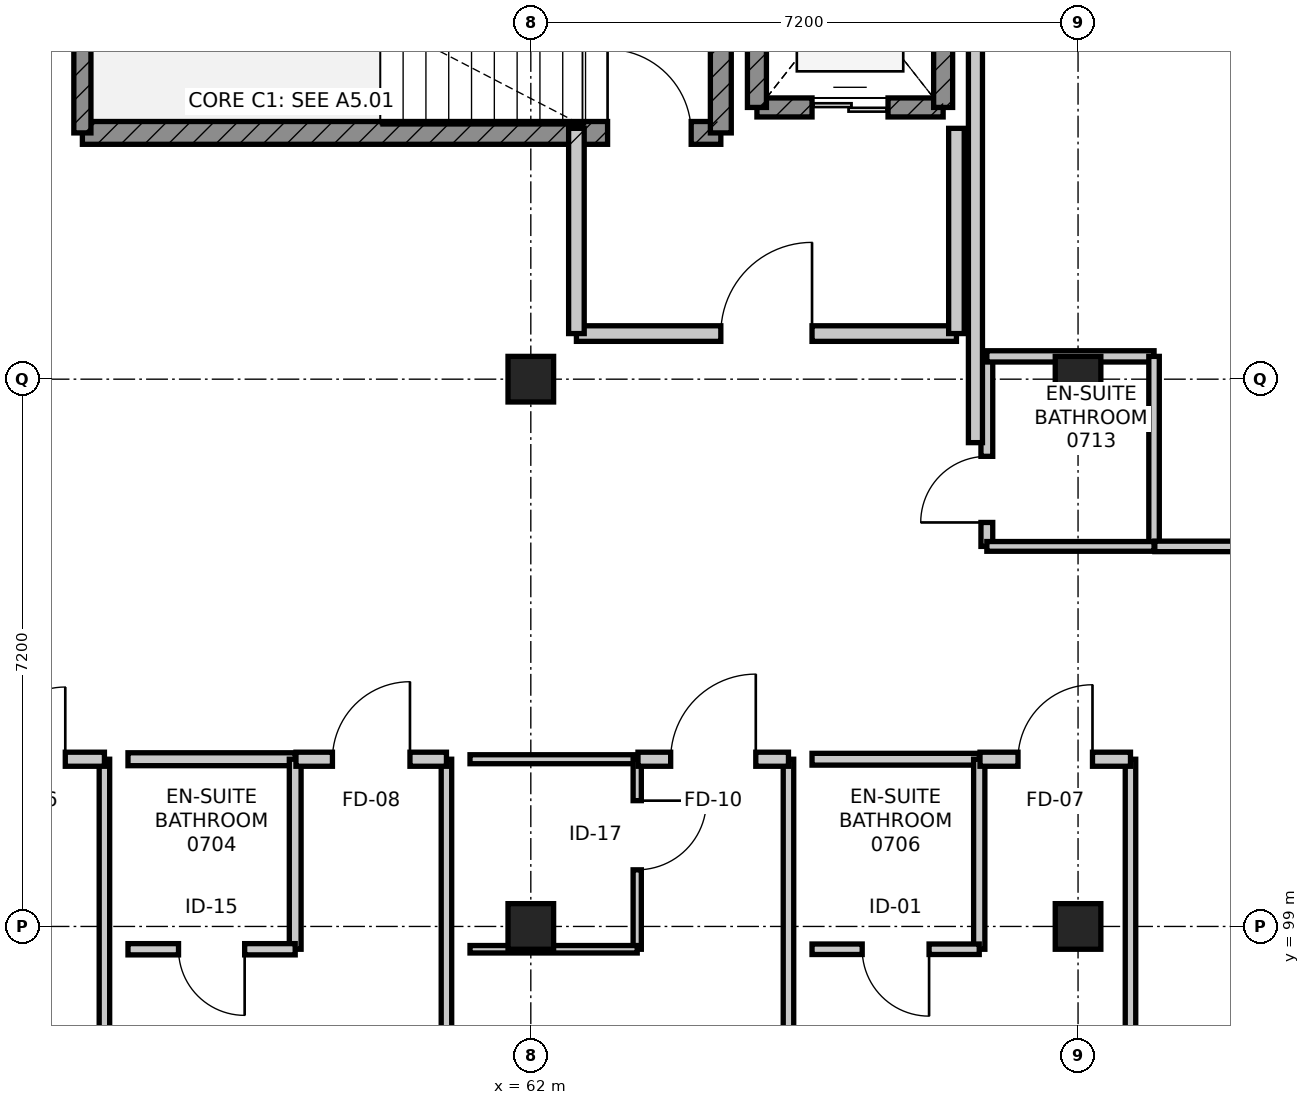
"""IFC4 building model, lengths in metres.
Left out: names, types, materials, properties, quantities, classifications, styles, units other than length and angle.
Written with IfcOpenShell. Run it as: python <this file> out.ifc"""

import sys

from ifc_helpers import new_model, si_unit, direction, frame, frame_2d, origin, origin_2d, place, context, subcontext, project, spatial, rectangle, extrude, element, fill, save


model = new_model("IFC4")
c1 = context("Model", 3, precision=1e-05, world=origin(), true_north=direction((0.0, 1.0)))
c2 = subcontext(c1, "Body", "Model", "MODEL_VIEW")
j1 = project(units=[si_unit("LENGTHUNIT", "METRE"), si_unit("PLANEANGLEUNIT", "RADIAN")], contexts=[c1])
p1 = place(None, origin())
s1 = spatial("IfcSite", under=j1, at=p1, CompositionType="ELEMENT")
p2 = place(p1, origin())
s2 = spatial("IfcBuilding", under=s1, at=p2, CompositionType="ELEMENT")
p3 = place(p2, frame((0.0, 0.0, 30.0)))
s3 = spatial("IfcBuildingStorey", under=s2, at=p3, CompositionType="ELEMENT", Elevation=30.0)
for number, where, z_axis, x_axis in (
    (1, (62.0, 99.0, 0.0), (0.0, 0.0, 1.0), (1.0, 0.0, 0.0)),
    (2, (62.0, 106.2, 0.0), (0.0, 0.0, 1.0), (1.0, 0.0, 0.0)),
    (3, (69.2, 99.0, 0.0), (0.0, 0.0, 1.0), (1.0, 0.0, 0.0)),
    (4, (69.2, 106.2, 0.0), (0.0, 0.0, 1.0), (1.0, 0.0, 0.0)),
):
    element("IfcColumn", number, at=place(p3, frame(where, z_axis=z_axis, x_axis=x_axis)), inside=s3, PredefinedType="COLUMN", context=c2, shape_type="SweptSolid", body=[
        extrude(rectangle(XDim=0.6, YDim=0.6, at=origin_2d()), origin(), (0.0, 0.0, 1.0), 3.6),
    ])
p4 = place(p3, frame((56.1, 109.44, 0.0), z_axis=(0.0, 0.0, 1.0), x_axis=(1.0, 0.0, 0.0)))
e5 = element("IfcWall", 5, at=p4, inside=s3, PredefinedType="SHEAR", context=c2, shape_type="SweptSolid", body=[
    extrude(rectangle(XDim=8.4, YDim=0.3, at=frame_2d((4.2, 0.0))), origin(), (0.0, 0.0, 1.0), 3.36),
])
p5 = place(p4, frame((6.91, 0.0, 0.0)))
e6 = element("IfcOpeningElement", 6, at=p5, cuts=e5, PredefinedType="OPENING", context=c2, shape_type="SweptSolid", body=[
    extrude(rectangle(XDim=1.1, YDim=2.1, at=frame_2d((0.55, 1.05))), frame((0.0, 0.16, 0.0), z_axis=(0.0, -1.0, 0.0), x_axis=(1.0, 0.0, 0.0)), (0.0, 0.0, 1.0), 0.32),
])
p6 = place(p3, frame((64.5, 109.44, 0.0), z_axis=(0.0, 0.0, 1.0), x_axis=(0.0, 1.0, 0.0)))
e7 = element("IfcWall", 7, at=p6, inside=s3, PredefinedType="SHEAR", context=c2, shape_type="SweptSolid", body=[
    extrude(rectangle(XDim=3.56, YDim=0.275, at=frame_2d((1.78, 0.0))), origin(), (0.0, 0.0, 1.0), 3.36),
])
p7 = place(p3, frame((56.1, 113.0, 0.0), z_axis=(0.0, 0.0, 1.0), x_axis=(0.0, -1.0, 0.0)))
e8 = element("IfcWall", 8, at=p7, inside=s3, PredefinedType="SHEAR", context=c2, shape_type="SweptSolid", body=[
    extrude(rectangle(XDim=3.56, YDim=0.225, at=frame_2d((1.78, 0.0))), origin(), (0.0, 0.0, 1.0), 3.36),
])
p8 = place(p3, frame((64.975, 109.775, 0.0), z_axis=(0.0, 0.0, 1.0), x_axis=(1.0, 0.0, 0.0)))
e9 = element("IfcWall", 9, at=p8, inside=s3, PredefinedType="SHEAR", context=c2, shape_type="SweptSolid", body=[
    extrude(rectangle(XDim=2.45, YDim=0.25, at=frame_2d((1.225, 0.0))), origin(), (0.0, 0.0, 1.0), 3.36),
])
p9 = place(p8, frame((0.725, 0.0, 0.0)))
e10 = element("IfcOpeningElement", 10, at=p9, cuts=e9, PredefinedType="OPENING", context=c2, shape_type="SweptSolid", body=[
    extrude(rectangle(XDim=1.0, YDim=2.15, at=frame_2d((0.5, 1.075))), frame((0.0, 0.135, 0.0), z_axis=(0.0, -1.0, 0.0), x_axis=(1.0, 0.0, 0.0)), (0.0, 0.0, 1.0), 0.27),
])
for number, where, z_axis, x_axis in (
    (11, (67.425, 109.775, 0.0), (0.0, 0.0, 1.0), (0.0, 1.0, 0.0)),
    (12, (64.975, 112.825, 0.0), (0.0, 0.0, 1.0), (0.0, -1.0, 0.0)),
):
    element("IfcWall", number, at=place(p3, frame(where, z_axis=z_axis, x_axis=x_axis)), inside=s3, PredefinedType="SHEAR", context=c2, shape_type="SweptSolid", body=[
        extrude(rectangle(XDim=3.05, YDim=0.25, at=frame_2d((1.525, 0.0))), origin(), (0.0, 0.0, 1.0), 3.36),
    ])
p10 = place(p3, frame((62.6, 106.8, 0.0), z_axis=(0.0, 0.0, 1.0), x_axis=(1.0, 0.0, 0.0)))
e13 = element("IfcWall", 13, at=p10, inside=s3, PredefinedType="PARTITIONING", context=c2, shape_type="SweptSolid", body=[
    extrude(rectangle(XDim=5.0, YDim=0.205, at=frame_2d((2.5, 0.0))), origin(), (0.0, 0.0, 1.0), 3.36),
])
p11 = place(p10, frame((1.9, 0.0, 0.0)))
e14 = element("IfcOpeningElement", 14, at=p11, cuts=e13, PredefinedType="OPENING", context=c2, shape_type="SweptSolid", body=[
    extrude(rectangle(XDim=1.2, YDim=2.1, at=frame_2d((0.6, 1.05))), frame((0.0, 0.113, 0.0), z_axis=(0.0, -1.0, 0.0), x_axis=(1.0, 0.0, 0.0)), (0.0, 0.0, 1.0), 0.225),
])
for number, where, z_axis, x_axis in (
    (15, (67.6, 106.8, 0.0), (0.0, 0.0, 1.0), (0.0, 1.0, 0.0)),
    (16, (62.6, 109.5, 0.0), (0.0, 0.0, 1.0), (0.0, -1.0, 0.0)),
):
    element("IfcWall", number, at=place(p3, frame(where, z_axis=z_axis, x_axis=x_axis)), inside=s3, PredefinedType="PARTITIONING", context=c2, shape_type="SweptSolid", body=[
        extrude(rectangle(XDim=2.7, YDim=0.205, at=frame_2d((1.35, 0.0))), origin(), (0.0, 0.0, 1.0), 3.36),
    ])
p12 = place(p3, frame((56.39, 101.2, 0.0), z_axis=(0.0, 0.0, 1.0), x_axis=(0.0, -1.0, 0.0)))
e17 = element("IfcWall", 17, at=p12, inside=s3, PredefinedType="PARTITIONING", context=c2, shape_type="SweptSolid", body=[
    extrude(rectangle(XDim=9.24, YDim=0.138, at=frame_2d((4.62, 0.0))), origin(), (0.0, 0.0, 1.0), 2.745),
])
p13 = place(p3, frame((54.41, 101.2, 0.0), z_axis=(0.0, 0.0, 1.0), x_axis=(1.0, 0.0, 0.0)))
e18 = element("IfcWall", 18, at=p13, inside=s3, PredefinedType="PARTITIONING", context=c2, shape_type="SweptSolid", body=[
    extrude(rectangle(XDim=1.98, YDim=0.185, at=frame_2d((0.99, 0.0))), origin(), (0.0, 0.0, 1.0), 2.695),
])
p14 = place(p13, frame((0.515, 0.0, 0.0)))
e19 = element("IfcOpeningElement", 19, at=p14, cuts=e18, PredefinedType="OPENING", context=c2, shape_type="SweptSolid", body=[
    extrude(rectangle(XDim=0.95, YDim=2.1, at=frame_2d((0.475, 1.05))), frame((0.0, 0.103, 0.0), z_axis=(0.0, -1.0, 0.0), x_axis=(1.0, 0.0, 0.0)), (0.0, 0.0, 1.0), 0.205),
])
p15 = place(p3, frame((56.7, 101.2, 0.0), z_axis=(0.0, 0.0, 1.0), x_axis=(1.0, 0.0, 0.0)))
e20 = element("IfcWall", 20, at=p15, inside=s3, PredefinedType="PARTITIONING", context=c2, shape_type="SweptSolid", body=[
    extrude(rectangle(XDim=2.2, YDim=0.17, at=frame_2d((1.1, 0.0))), origin(), (0.0, 0.0, 1.0), 3.36),
])
p16 = place(p3, frame((58.9, 101.2, 0.0), z_axis=(0.0, 0.0, 1.0), x_axis=(0.0, -1.0, 0.0)))
e21 = element("IfcWall", 21, at=p16, inside=s3, PredefinedType="PARTITIONING", context=c2, shape_type="SweptSolid", body=[
    extrude(rectangle(XDim=2.5, YDim=0.155, at=frame_2d((1.25, 0.0))), origin(), (0.0, 0.0, 1.0), 2.745),
])
p17 = place(p3, frame((58.9, 98.7, 0.0), z_axis=(0.0, 0.0, 1.0), x_axis=(-1.0, 0.0, 0.0)))
e22 = element("IfcWall", 22, at=p17, inside=s3, PredefinedType="PARTITIONING", context=c2, shape_type="SweptSolid", body=[
    extrude(rectangle(XDim=2.2, YDim=0.148, at=frame_2d((1.1, 0.0))), origin(), (0.0, 0.0, 1.0), 3.36),
])
p18 = place(p17, frame((0.665, 0.0, 0.0)))
e23 = element("IfcOpeningElement", 23, at=p18, cuts=e22, PredefinedType="OPENING", context=c2, shape_type="SweptSolid", body=[
    extrude(rectangle(XDim=0.87, YDim=2.07, at=frame_2d((0.435, 1.035))), frame((0.0, 0.084, 0.0), z_axis=(0.0, -1.0, 0.0), x_axis=(1.0, 0.0, 0.0)), (0.0, 0.0, 1.0), 0.168),
])
p19 = place(p3, frame((60.89, 101.2, 0.0), z_axis=(0.0, 0.0, 1.0), x_axis=(0.0, -1.0, 0.0)))
e24 = element("IfcWall", 24, at=p19, inside=s3, PredefinedType="PARTITIONING", context=c2, shape_type="SweptSolid", body=[
    extrude(rectangle(XDim=9.24, YDim=0.138, at=frame_2d((4.62, 0.0))), origin(), (0.0, 0.0, 1.0), 2.745),
])
p20 = place(p3, frame((58.91, 101.2, 0.0), z_axis=(0.0, 0.0, 1.0), x_axis=(1.0, 0.0, 0.0)))
e25 = element("IfcWall", 25, at=p20, inside=s3, PredefinedType="PARTITIONING", context=c2, shape_type="SweptSolid", body=[
    extrude(rectangle(XDim=1.98, YDim=0.185, at=frame_2d((0.99, 0.0))), origin(), (0.0, 0.0, 1.0), 3.36),
])
p21 = place(p20, frame((0.48, 0.0, 0.0)))
e26 = element("IfcOpeningElement", 26, at=p21, cuts=e25, PredefinedType="OPENING", context=c2, shape_type="SweptSolid", body=[
    extrude(rectangle(XDim=1.02, YDim=2.15, at=frame_2d((0.51, 1.075))), frame((0.0, 0.103, 0.0), z_axis=(0.0, -1.0, 0.0), x_axis=(1.0, 0.0, 0.0)), (0.0, 0.0, 1.0), 0.205),
])
p22 = place(p3, frame((61.2, 101.2, 0.0), z_axis=(0.0, 0.0, 1.0), x_axis=(1.0, 0.0, 0.0)))
e27 = element("IfcWall", 27, at=p22, inside=s3, PredefinedType="PARTITIONING", context=c2, shape_type="SweptSolid", body=[
    extrude(rectangle(XDim=2.2, YDim=0.118, at=frame_2d((1.1, 0.0))), origin(), (0.0, 0.0, 1.0), 2.695),
])
p23 = place(p3, frame((63.4, 101.2, 0.0), z_axis=(0.0, 0.0, 1.0), x_axis=(0.0, -1.0, 0.0)))
e28 = element("IfcWall", 28, at=p23, inside=s3, PredefinedType="PARTITIONING", context=c2, shape_type="SweptSolid", body=[
    extrude(rectangle(XDim=2.5, YDim=0.108, at=frame_2d((1.25, 0.0))), origin(), (0.0, 0.0, 1.0), 2.745),
])
p24 = place(p23, frame((0.545, 0.0, 0.0)))
e29 = element("IfcOpeningElement", 29, at=p24, cuts=e28, PredefinedType="OPENING", context=c2, shape_type="SweptSolid", body=[
    extrude(rectangle(XDim=0.91, YDim=2.11, at=frame_2d((0.455, 1.055))), frame((0.0, 0.064, 0.0), z_axis=(0.0, -1.0, 0.0), x_axis=(1.0, 0.0, 0.0)), (0.0, 0.0, 1.0), 0.128),
])
p25 = place(p3, frame((63.4, 98.7, 0.0), z_axis=(0.0, 0.0, 1.0), x_axis=(-1.0, 0.0, 0.0)))
e30 = element("IfcWall", 30, at=p25, inside=s3, PredefinedType="PARTITIONING", context=c2, shape_type="SweptSolid", body=[
    extrude(rectangle(XDim=2.2, YDim=0.098, at=frame_2d((1.1, 0.0))), origin(), (0.0, 0.0, 1.0), 2.695),
])
p26 = place(p3, frame((65.39, 101.2, 0.0), z_axis=(0.0, 0.0, 1.0), x_axis=(0.0, -1.0, 0.0)))
e31 = element("IfcWall", 31, at=p26, inside=s3, PredefinedType="PARTITIONING", context=c2, shape_type="SweptSolid", body=[
    extrude(rectangle(XDim=9.24, YDim=0.138, at=frame_2d((4.62, 0.0))), origin(), (0.0, 0.0, 1.0), 2.745),
])
p27 = place(p3, frame((63.41, 101.2, 0.0), z_axis=(0.0, 0.0, 1.0), x_axis=(1.0, 0.0, 0.0)))
e32 = element("IfcWall", 32, at=p27, inside=s3, PredefinedType="PARTITIONING", context=c2, shape_type="SweptSolid", body=[
    extrude(rectangle(XDim=1.98, YDim=0.185, at=frame_2d((0.99, 0.0))), origin(), (0.0, 0.0, 1.0), 3.36),
])
p28 = place(p27, frame((0.43, 0.0, 0.0)))
e33 = element("IfcOpeningElement", 33, at=p28, cuts=e32, PredefinedType="OPENING", context=c2, shape_type="SweptSolid", body=[
    extrude(rectangle(XDim=1.12, YDim=2.2, at=frame_2d((0.56, 1.1))), frame((0.0, 0.103, 0.0), z_axis=(0.0, -1.0, 0.0), x_axis=(1.0, 0.0, 0.0)), (0.0, 0.0, 1.0), 0.205),
])
p29 = place(p3, frame((65.7, 101.2, 0.0), z_axis=(0.0, 0.0, 1.0), x_axis=(1.0, 0.0, 0.0)))
e34 = element("IfcWall", 34, at=p29, inside=s3, PredefinedType="PARTITIONING", context=c2, shape_type="SweptSolid", body=[
    extrude(rectangle(XDim=2.2, YDim=0.155, at=frame_2d((1.1, 0.0))), origin(), (0.0, 0.0, 1.0), 3.36),
])
p30 = place(p3, frame((67.9, 101.2, 0.0), z_axis=(0.0, 0.0, 1.0), x_axis=(0.0, -1.0, 0.0)))
e35 = element("IfcWall", 35, at=p30, inside=s3, PredefinedType="PARTITIONING", context=c2, shape_type="SweptSolid", body=[
    extrude(rectangle(XDim=2.5, YDim=0.148, at=frame_2d((1.25, 0.0))), origin(), (0.0, 0.0, 1.0), 2.745),
])
p31 = place(p3, frame((67.9, 98.7, 0.0), z_axis=(0.0, 0.0, 1.0), x_axis=(-1.0, 0.0, 0.0)))
e36 = element("IfcWall", 36, at=p31, inside=s3, PredefinedType="PARTITIONING", context=c2, shape_type="SweptSolid", body=[
    extrude(rectangle(XDim=2.2, YDim=0.138, at=frame_2d((1.1, 0.0))), origin(), (0.0, 0.0, 1.0), 3.36),
])
p32 = place(p31, frame((0.66, 0.0, 0.0)))
e37 = element("IfcOpeningElement", 37, at=p32, cuts=e36, PredefinedType="OPENING", context=c2, shape_type="SweptSolid", body=[
    extrude(rectangle(XDim=0.88, YDim=2.06, at=frame_2d((0.44, 1.03))), frame((0.0, 0.079, 0.0), z_axis=(0.0, -1.0, 0.0), x_axis=(1.0, 0.0, 0.0)), (0.0, 0.0, 1.0), 0.158),
])
p33 = place(p3, frame((69.89, 101.2, 0.0), z_axis=(0.0, 0.0, 1.0), x_axis=(0.0, -1.0, 0.0)))
e38 = element("IfcWall", 38, at=p33, inside=s3, PredefinedType="PARTITIONING", context=c2, shape_type="SweptSolid", body=[
    extrude(rectangle(XDim=9.24, YDim=0.138, at=frame_2d((4.62, 0.0))), origin(), (0.0, 0.0, 1.0), 2.745),
])
p34 = place(p3, frame((67.91, 101.2, 0.0), z_axis=(0.0, 0.0, 1.0), x_axis=(1.0, 0.0, 0.0)))
e39 = element("IfcWall", 39, at=p34, inside=s3, PredefinedType="PARTITIONING", context=c2, shape_type="SweptSolid", body=[
    extrude(rectangle(XDim=1.98, YDim=0.185, at=frame_2d((0.99, 0.0))), origin(), (0.0, 0.0, 1.0), 2.695),
])
p35 = place(p34, frame((0.5, 0.0, 0.0)))
e40 = element("IfcOpeningElement", 40, at=p35, cuts=e39, PredefinedType="OPENING", context=c2, shape_type="SweptSolid", body=[
    extrude(rectangle(XDim=0.98, YDim=2.15, at=frame_2d((0.49, 1.075))), frame((0.0, 0.103, 0.0), z_axis=(0.0, -1.0, 0.0), x_axis=(1.0, 0.0, 0.0)), (0.0, 0.0, 1.0), 0.205),
])
p36 = place(p3, frame((68.0, 104.0, 0.0), z_axis=(0.0, 0.0, 1.0), x_axis=(0.0, 1.0, 0.0)))
e41 = element("IfcWall", 41, at=p36, inside=s3, PredefinedType="PARTITIONING", context=c2, shape_type="SweptSolid", body=[
    extrude(rectangle(XDim=2.5, YDim=0.155, at=frame_2d((1.25, 0.0))), origin(), (0.0, 0.0, 1.0), 2.745),
])
p37 = place(p36, frame((0.315, 0.0, 0.0)))
e42 = element("IfcOpeningElement", 42, at=p37, cuts=e41, PredefinedType="OPENING", context=c2, shape_type="SweptSolid", body=[
    extrude(rectangle(XDim=0.87, YDim=2.07, at=frame_2d((0.435, 1.035))), frame((0.0, 0.087, 0.0), z_axis=(0.0, -1.0, 0.0), x_axis=(1.0, 0.0, 0.0)), (0.0, 0.0, 1.0), 0.175),
])
p38 = place(p3, frame((68.0, 106.5, 0.0), z_axis=(0.0, 0.0, 1.0), x_axis=(1.0, 0.0, 0.0)))
e43 = element("IfcWall", 43, at=p38, inside=s3, PredefinedType="PARTITIONING", context=c2, shape_type="SweptSolid", body=[
    extrude(rectangle(XDim=2.2, YDim=0.148, at=frame_2d((1.1, 0.0))), origin(), (0.0, 0.0, 1.0), 2.695),
])
p39 = place(p3, frame((70.2, 106.5, 0.0), z_axis=(0.0, 0.0, 1.0), x_axis=(0.0, -1.0, 0.0)))
e44 = element("IfcWall", 44, at=p39, inside=s3, PredefinedType="PARTITIONING", context=c2, shape_type="SweptSolid", body=[
    extrude(rectangle(XDim=2.5, YDim=0.138, at=frame_2d((1.25, 0.0))), origin(), (0.0, 0.0, 1.0), 2.745),
])
p40 = place(p3, frame((70.2, 104.0, 0.0), z_axis=(0.0, 0.0, 1.0), x_axis=(-1.0, 0.0, 0.0)))
e45 = element("IfcWall", 45, at=p40, inside=s3, PredefinedType="PARTITIONING", context=c2, shape_type="SweptSolid", body=[
    extrude(rectangle(XDim=2.2, YDim=0.128, at=frame_2d((1.1, 0.0))), origin(), (0.0, 0.0, 1.0), 2.695),
])
p41 = place(p3, frame((67.85, 105.365, 0.0), z_axis=(0.0, 0.0, 1.0), x_axis=(0.0, 1.0, 0.0)))
e46 = element("IfcWall", 46, at=p41, inside=s3, PredefinedType="PARTITIONING", context=c2, shape_type="SweptSolid", body=[
    extrude(rectangle(XDim=9.671, YDim=0.185, at=frame_2d((4.835, 0.0))), origin(), (0.0, 0.0, 1.0), 2.745),
])
p42 = place(p3, frame((73.39, 104.0, 0.0), z_axis=(0.0, 0.0, 1.0), x_axis=(-1.0, 0.0, 0.0)))
e47 = element("IfcWall", 47, at=p42, inside=s3, PredefinedType="PARTITIONING", context=c2, shape_type="SweptSolid", body=[
    extrude(rectangle(XDim=3.18, YDim=0.138, at=frame_2d((1.59, 0.0))), origin(), (0.0, 0.0, 1.0), 3.36),
])
p43 = place(p42, frame((1.115, 0.0, 0.0)))
e48 = element("IfcOpeningElement", 48, at=p43, cuts=e47, PredefinedType="OPENING", context=c2, shape_type="SweptSolid", body=[
    extrude(rectangle(XDim=0.95, YDim=2.1, at=frame_2d((0.475, 1.05))), frame((0.0, 0.079, 0.0), z_axis=(0.0, -1.0, 0.0), x_axis=(1.0, 0.0, 0.0)), (0.0, 0.0, 1.0), 0.158),
])
p44 = place(p5, origin())
e49 = element("IfcDoor", 49, at=p44, inside=s3, OperationType="SINGLE_SWING_LEFT", PredefinedType="DOOR", context=c2, shape_type="SweptSolid", body=[
    extrude(rectangle(XDim=1.1, YDim=2.1, at=frame_2d((0.55, 1.05))), frame((0.0, 0.025, 0.0), z_axis=(0.0, -1.0, 0.0), x_axis=(1.0, 0.0, 0.0)), (0.0, 0.0, 1.0), 0.05),
])
fill(e6, e49)
p45 = place(p9, origin())
e50 = element("IfcDoor", 50, at=p45, inside=s3, OperationType="DOUBLE_DOOR_SLIDING", PredefinedType="DOOR", context=c2, shape_type="SweptSolid", body=[
    extrude(rectangle(XDim=1.0, YDim=2.15, at=frame_2d((0.5, 1.075))), frame((0.0, 0.025, 0.0), z_axis=(0.0, -1.0, 0.0), x_axis=(1.0, 0.0, 0.0)), (0.0, 0.0, 1.0), 0.05),
])
fill(e10, e50)
p46 = place(p11, origin())
e51 = element("IfcDoor", 51, at=p46, inside=s3, OperationType="SINGLE_SWING_RIGHT", PredefinedType="DOOR", context=c2, shape_type="SweptSolid", body=[
    extrude(rectangle(XDim=1.2, YDim=2.1, at=frame_2d((0.6, 1.05))), frame((0.0, 0.025, 0.0), z_axis=(0.0, -1.0, 0.0), x_axis=(1.0, 0.0, 0.0)), (0.0, 0.0, 1.0), 0.05),
])
fill(e14, e51)
p47 = place(p14, origin())
e52 = element("IfcDoor", 52, at=p47, inside=s3, OperationType="SINGLE_SWING_RIGHT", PredefinedType="DOOR", context=c2, shape_type="SweptSolid", body=[
    extrude(rectangle(XDim=0.95, YDim=2.1, at=frame_2d((0.475, 1.05))), frame((0.0, 0.025, 0.0), z_axis=(0.0, -1.0, 0.0), x_axis=(1.0, 0.0, 0.0)), (0.0, 0.0, 1.0), 0.05),
])
fill(e19, e52)
p48 = place(p18, origin())
e53 = element("IfcDoor", 53, at=p48, inside=s3, OperationType="SINGLE_SWING_LEFT", PredefinedType="DOOR", context=c2, shape_type="SweptSolid", body=[
    extrude(rectangle(XDim=0.87, YDim=2.07, at=frame_2d((0.435, 1.035))), frame((0.0, 0.025, 0.0), z_axis=(0.0, -1.0, 0.0), x_axis=(1.0, 0.0, 0.0)), (0.0, 0.0, 1.0), 0.05),
])
fill(e23, e53)
p49 = place(p21, origin())
e54 = element("IfcDoor", 54, at=p49, inside=s3, OperationType="SINGLE_SWING_RIGHT", PredefinedType="DOOR", context=c2, shape_type="SweptSolid", body=[
    extrude(rectangle(XDim=1.02, YDim=2.15, at=frame_2d((0.51, 1.075))), frame((0.0, 0.025, 0.0), z_axis=(0.0, -1.0, 0.0), x_axis=(1.0, 0.0, 0.0)), (0.0, 0.0, 1.0), 0.05),
])
fill(e26, e54)
p50 = place(p24, origin())
e55 = element("IfcDoor", 55, at=p50, inside=s3, OperationType="SINGLE_SWING_LEFT", PredefinedType="DOOR", context=c2, shape_type="SweptSolid", body=[
    extrude(rectangle(XDim=0.91, YDim=2.11, at=frame_2d((0.455, 1.055))), frame((0.0, 0.025, 0.0), z_axis=(0.0, -1.0, 0.0), x_axis=(1.0, 0.0, 0.0)), (0.0, 0.0, 1.0), 0.05),
])
fill(e29, e55)
p51 = place(p28, origin())
e56 = element("IfcDoor", 56, at=p51, inside=s3, OperationType="SINGLE_SWING_RIGHT", PredefinedType="DOOR", context=c2, shape_type="SweptSolid", body=[
    extrude(rectangle(XDim=1.12, YDim=2.2, at=frame_2d((0.56, 1.1))), frame((0.0, 0.025, 0.0), z_axis=(0.0, -1.0, 0.0), x_axis=(1.0, 0.0, 0.0)), (0.0, 0.0, 1.0), 0.05),
])
fill(e33, e56)
p52 = place(p32, origin())
e57 = element("IfcDoor", 57, at=p52, inside=s3, OperationType="SINGLE_SWING_LEFT", PredefinedType="DOOR", context=c2, shape_type="SweptSolid", body=[
    extrude(rectangle(XDim=0.88, YDim=2.06, at=frame_2d((0.44, 1.03))), frame((0.0, 0.025, 0.0), z_axis=(0.0, -1.0, 0.0), x_axis=(1.0, 0.0, 0.0)), (0.0, 0.0, 1.0), 0.05),
])
fill(e37, e57)
p53 = place(p35, origin())
e58 = element("IfcDoor", 58, at=p53, inside=s3, OperationType="SINGLE_SWING_RIGHT", PredefinedType="DOOR", context=c2, shape_type="SweptSolid", body=[
    extrude(rectangle(XDim=0.98, YDim=2.15, at=frame_2d((0.49, 1.075))), frame((0.0, 0.025, 0.0), z_axis=(0.0, -1.0, 0.0), x_axis=(1.0, 0.0, 0.0)), (0.0, 0.0, 1.0), 0.05),
])
fill(e40, e58)
p54 = place(p37, origin())
e59 = element("IfcDoor", 59, at=p54, inside=s3, OperationType="SINGLE_SWING_LEFT", PredefinedType="DOOR", context=c2, shape_type="SweptSolid", body=[
    extrude(rectangle(XDim=0.87, YDim=2.07, at=frame_2d((0.435, 1.035))), frame((0.0, 0.025, 0.0), z_axis=(0.0, -1.0, 0.0), x_axis=(1.0, 0.0, 0.0)), (0.0, 0.0, 1.0), 0.05),
])
fill(e42, e59)
save(model, sys.argv[1])
